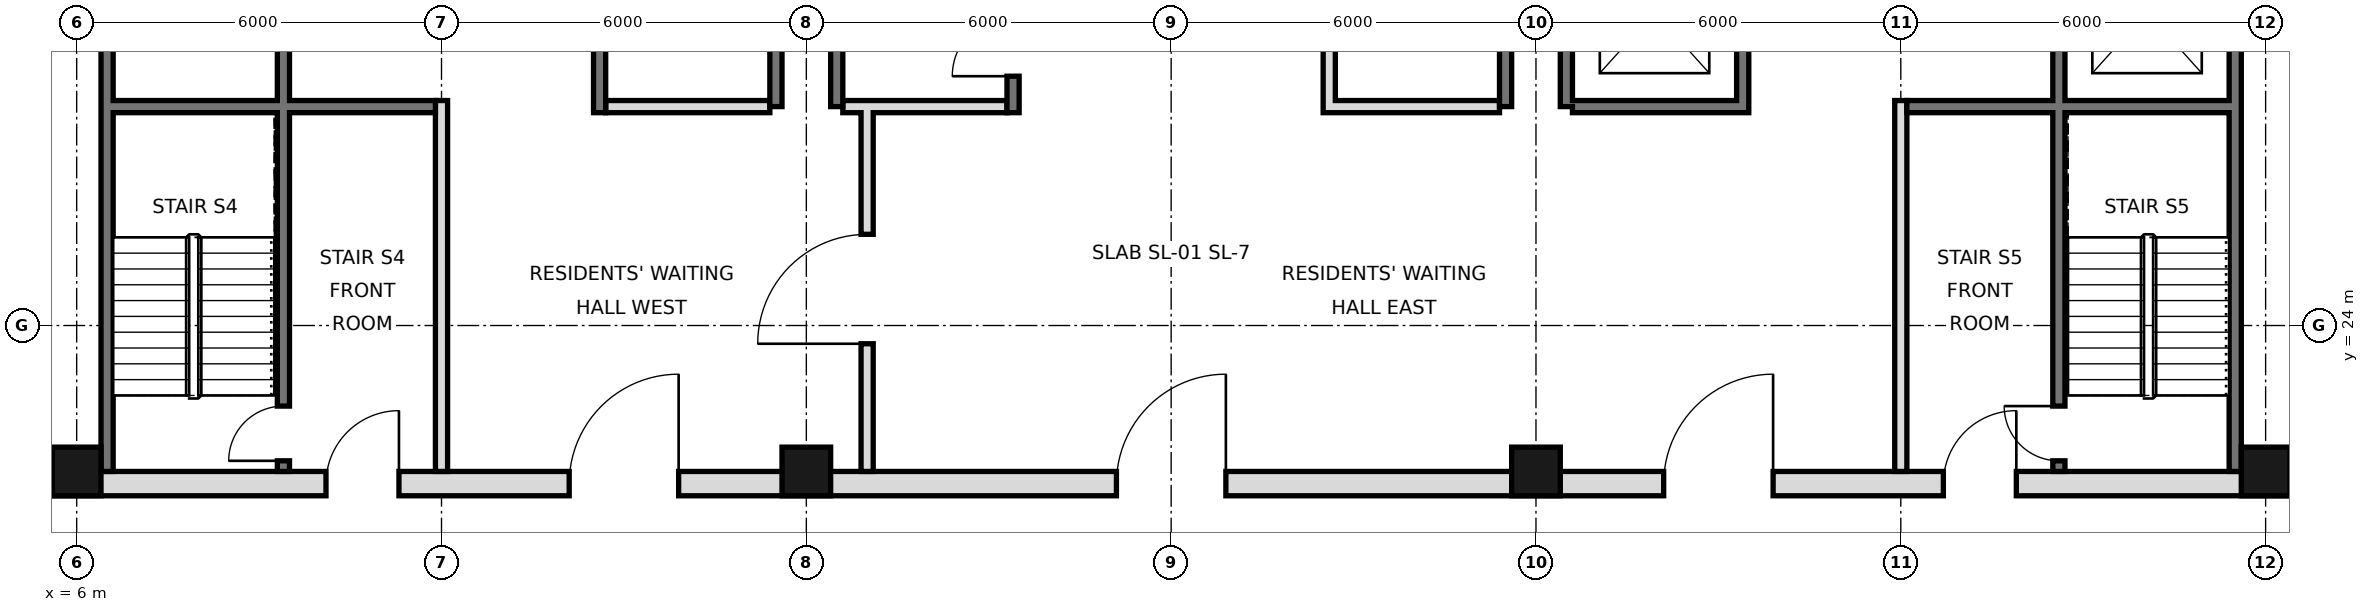
"""IFC4 building model, lengths in metres.
Left out: names, types, materials, properties, quantities, classifications, styles, units other than length and angle.
Written with IfcOpenShell. Run it as: python <this file> out.ifc"""

import sys

from ifc_helpers import new_model, si_unit, direction, frame, frame_2d, origin, origin_2d, place, context, subcontext, project, spatial, rectangle, hollow_rectangle, extrude, element, fill, save


model = new_model("IFC4")
c1 = context("Model", 3, precision=1e-05, world=origin(), true_north=direction((0.0, 1.0)))
c2 = subcontext(c1, "Body", "Model", "MODEL_VIEW")
j1 = project(units=[si_unit("LENGTHUNIT", "METRE"), si_unit("PLANEANGLEUNIT", "RADIAN")], contexts=[c1])
p1 = place(None, origin())
s1 = spatial("IfcSite", under=j1, at=p1, CompositionType="ELEMENT")
p2 = place(p1, origin())
s2 = spatial("IfcBuilding", under=s1, at=p2, CompositionType="ELEMENT")
p3 = place(p2, frame((0.0, 0.0, 250.4)))
s3 = spatial("IfcBuildingStorey", under=s2, at=p3, CompositionType="ELEMENT", Elevation=250.4)
for number, where, z_axis, x_axis in (
    (1, (6.0, 21.6, 0.0), (0.0, 0.0, 1.0), (1.0, 0.0, 0.0)),
    (2, (18.0, 21.6, 0.0), (0.0, 0.0, 1.0), (1.0, 0.0, 0.0)),
    (3, (30.0, 21.6, 0.0), (0.0, 0.0, 1.0), (1.0, 0.0, 0.0)),
    (4, (42.0, 21.6, 0.0), (0.0, 0.0, 1.0), (1.0, 0.0, 0.0)),
):
    element("IfcColumn", number, at=place(p3, frame(where, z_axis=z_axis, x_axis=x_axis)), inside=s3, PredefinedType="COLUMN", context=c2, shape_type="SweptSolid", body=[
        extrude(hollow_rectangle(XDim=0.8, YDim=0.8, WallThickness=0.032, at=origin_2d()), origin(), (0.0, 0.0, 1.0), 3.6),
    ])
for number, where, z_axis, x_axis in (
    (5, (6.5, 21.6, 0.0), (0.0, 0.0, 1.0), (0.0, 1.0, 0.0)),
    (6, (41.5, 21.6, 0.0), (0.0, 0.0, 1.0), (0.0, 1.0, 0.0)),
):
    element("IfcWall", number, at=place(p3, frame(where, z_axis=z_axis, x_axis=x_axis)), inside=s3, PredefinedType="SOLIDWALL", context=c2, shape_type="SweptSolid", body=[
        extrude(rectangle(XDim=23.5, YDim=0.2, at=frame_2d((11.75, 0.0))), origin(), (0.0, 0.0, 1.0), 3.42),
    ])
for number, where, z_axis, x_axis in (
    (7, (17.5, 27.6, 0.0), (0.0, 0.0, 1.0), (0.0, 1.0, 0.0)),
    (8, (18.5, 27.6, 0.0), (0.0, 0.0, 1.0), (0.0, 1.0, 0.0)),
    (9, (29.5, 27.6, 0.0), (0.0, 0.0, 1.0), (0.0, 1.0, 0.0)),
    (10, (30.5, 27.6, 0.0), (0.0, 0.0, 1.0), (0.0, 1.0, 0.0)),
):
    element("IfcWall", number, at=place(p3, frame(where, z_axis=z_axis, x_axis=x_axis)), inside=s3, PredefinedType="SOLIDWALL", context=c2, shape_type="SweptSolid", body=[
        extrude(rectangle(XDim=17.5, YDim=0.2, at=frame_2d((8.75, 0.0))), origin(), (0.0, 0.0, 1.0), 3.42),
    ])
p4 = place(p3, frame((5.6, 21.4, 0.0), z_axis=(0.0, 0.0, 1.0), x_axis=(1.0, 0.0, 0.0)))
e11 = element("IfcWall", 11, at=p4, inside=s3, PredefinedType="SOLIDWALL", context=c2, shape_type="SweptSolid", body=[
    extrude(rectangle(XDim=36.8, YDim=0.4, at=frame_2d((18.4, 0.0))), origin(), (0.0, 0.0, 1.0), 3.42),
])
p5 = place(p4, frame((8.5, 0.0, 0.0)))
e12 = element("IfcOpeningElement", 12, at=p5, cuts=e11, PredefinedType="OPENING", context=c2, shape_type="SweptSolid", body=[
    extrude(rectangle(XDim=1.8, YDim=2.1, at=frame_2d((0.9, 1.05))), frame((0.0, 0.21, 0.0), z_axis=(0.0, -1.0, 0.0), x_axis=(1.0, 0.0, 0.0)), (0.0, 0.0, 1.0), 0.42),
])
p6 = place(p4, frame((17.5, 0.0, 0.0)))
e13 = element("IfcOpeningElement", 13, at=p6, cuts=e11, PredefinedType="OPENING", context=c2, shape_type="SweptSolid", body=[
    extrude(rectangle(XDim=1.8, YDim=2.1, at=frame_2d((0.9, 1.05))), frame((0.0, 0.21, 0.0), z_axis=(0.0, -1.0, 0.0), x_axis=(1.0, 0.0, 0.0)), (0.0, 0.0, 1.0), 0.42),
])
p7 = place(p4, frame((26.5, 0.0, 0.0)))
e14 = element("IfcOpeningElement", 14, at=p7, cuts=e11, PredefinedType="OPENING", context=c2, shape_type="SweptSolid", body=[
    extrude(rectangle(XDim=1.8, YDim=2.1, at=frame_2d((0.9, 1.05))), frame((0.0, 0.21, 0.0), z_axis=(0.0, -1.0, 0.0), x_axis=(1.0, 0.0, 0.0)), (0.0, 0.0, 1.0), 0.42),
])
p8 = place(p4, frame((4.5, 0.0, 0.0)))
e15 = element("IfcOpeningElement", 15, at=p8, cuts=e11, PredefinedType="OPENING", context=c2, shape_type="SweptSolid", body=[
    extrude(rectangle(XDim=1.2, YDim=2.1, at=frame_2d((0.6, 1.05))), frame((0.0, 0.21, 0.0), z_axis=(0.0, -1.0, 0.0), x_axis=(1.0, 0.0, 0.0)), (0.0, 0.0, 1.0), 0.42),
])
p9 = place(p4, frame((31.1, 0.0, 0.0)))
e16 = element("IfcOpeningElement", 16, at=p9, cuts=e11, PredefinedType="OPENING", context=c2, shape_type="SweptSolid", body=[
    extrude(rectangle(XDim=1.2, YDim=2.1, at=frame_2d((0.6, 1.05))), frame((0.0, 0.21, 0.0), z_axis=(0.0, -1.0, 0.0), x_axis=(1.0, 0.0, 0.0)), (0.0, 0.0, 1.0), 0.42),
])
p10 = place(p3, frame((19.0, 21.6, 0.0), z_axis=(0.0, 0.0, 1.0), x_axis=(0.0, 1.0, 0.0)))
e17 = element("IfcWall", 17, at=p10, inside=s3, PredefinedType="PARTITIONING", context=c2, shape_type="SweptSolid", body=[
    extrude(rectangle(XDim=6.0, YDim=0.2, at=frame_2d((3.0, 0.0))), origin(), (0.0, 0.0, 1.0), 3.42),
])
p11 = place(p10, frame((2.1, 0.0, 0.0)))
e18 = element("IfcOpeningElement", 18, at=p11, cuts=e17, PredefinedType="OPENING", context=c2, shape_type="SweptSolid", body=[
    extrude(rectangle(XDim=1.8, YDim=2.1, at=frame_2d((0.9, 1.05))), frame((0.0, 0.11, 0.0), z_axis=(0.0, -1.0, 0.0), x_axis=(1.0, 0.0, 0.0)), (0.0, 0.0, 1.0), 0.22),
])
p12 = place(p3, frame((12.0, 21.6, 0.0), z_axis=(0.0, 0.0, 1.0), x_axis=(0.0, 1.0, 0.0)))
e19 = element("IfcWall", 19, at=p12, inside=s3, PredefinedType="PARTITIONING", context=c2, shape_type="SweptSolid", body=[
    extrude(rectangle(XDim=6.1, YDim=0.2, at=frame_2d((3.05, 0.0))), origin(), (0.0, 0.0, 1.0), 3.42),
])
p13 = place(p3, frame((14.6, 27.5, 0.0), z_axis=(0.0, 0.0, 1.0), x_axis=(0.0, 1.0, 0.0)))
e20 = element("IfcWall", 20, at=p13, inside=s3, PredefinedType="SOLIDWALL", context=c2, shape_type="SweptSolid", body=[
    extrude(rectangle(XDim=17.5, YDim=0.2, at=frame_2d((8.75, 0.0))), origin(), (0.0, 0.0, 1.0), 3.42),
])
p14 = place(p13, frame((15.4, 0.0, 0.0)))
e21 = element("IfcOpeningElement", 21, at=p14, cuts=e20, PredefinedType="OPENING", context=c2, shape_type="SweptSolid", body=[
    extrude(rectangle(XDim=1.1, YDim=2.1, at=frame_2d((0.55, 1.05))), frame((0.0, 0.11, 0.0), z_axis=(0.0, -1.0, 0.0), x_axis=(1.0, 0.0, 0.0)), (0.0, 0.0, 1.0), 0.22),
])
p15 = place(p13, frame((2.7, 0.0, 0.0)))
e22 = element("IfcOpeningElement", 22, at=p15, cuts=e20, PredefinedType="OPENING", context=c2, shape_type="SweptSolid", body=[
    extrude(rectangle(XDim=1.0, YDim=2.1, at=frame_2d((0.5, 1.05))), frame((0.0, 0.11, 0.0), z_axis=(0.0, -1.0, 0.0), x_axis=(1.0, 0.0, 0.0)), (0.0, 0.0, 1.0), 0.22),
])
p16 = place(p13, frame((9.9, 0.0, 0.0)))
e23 = element("IfcOpeningElement", 23, at=p16, cuts=e20, PredefinedType="OPENING", context=c2, shape_type="SweptSolid", body=[
    extrude(rectangle(XDim=0.9, YDim=2.1, at=frame_2d((0.45, 1.05))), frame((0.0, 0.11, 0.0), z_axis=(0.0, -1.0, 0.0), x_axis=(1.0, 0.0, 0.0)), (0.0, 0.0, 1.0), 0.22),
])
p17 = place(p3, frame((21.4, 27.5, 0.0), z_axis=(0.0, 0.0, 1.0), x_axis=(0.0, 1.0, 0.0)))
e24 = element("IfcWall", 24, at=p17, inside=s3, PredefinedType="SOLIDWALL", context=c2, shape_type="SweptSolid", body=[
    extrude(rectangle(XDim=17.5, YDim=0.2, at=frame_2d((8.75, 0.0))), origin(), (0.0, 0.0, 1.0), 3.42),
])
p18 = place(p17, frame((0.6, 0.0, 0.0)))
e25 = element("IfcOpeningElement", 25, at=p18, cuts=e24, PredefinedType="OPENING", context=c2, shape_type="SweptSolid", body=[
    extrude(rectangle(XDim=1.0, YDim=2.1, at=frame_2d((0.5, 1.05))), frame((0.0, 0.11, 0.0), z_axis=(0.0, -1.0, 0.0), x_axis=(1.0, 0.0, 0.0)), (0.0, 0.0, 1.0), 0.22),
])
p19 = place(p17, frame((3.7, 0.0, 0.0)))
e26 = element("IfcOpeningElement", 26, at=p19, cuts=e24, PredefinedType="OPENING", context=c2, shape_type="SweptSolid", body=[
    extrude(rectangle(XDim=1.0, YDim=2.1, at=frame_2d((0.5, 1.05))), frame((0.0, 0.11, 0.0), z_axis=(0.0, -1.0, 0.0), x_axis=(1.0, 0.0, 0.0)), (0.0, 0.0, 1.0), 0.22),
])
p20 = place(p17, frame((9.8, 0.0, 0.0)))
e27 = element("IfcOpeningElement", 27, at=p20, cuts=e24, PredefinedType="OPENING", context=c2, shape_type="SweptSolid", body=[
    extrude(rectangle(XDim=1.0, YDim=2.1, at=frame_2d((0.5, 1.05))), frame((0.0, 0.11, 0.0), z_axis=(0.0, -1.0, 0.0), x_axis=(1.0, 0.0, 0.0)), (0.0, 0.0, 1.0), 0.22),
])
p21 = place(p17, frame((7.4, 0.0, 0.0)))
e28 = element("IfcOpeningElement", 28, at=p21, cuts=e24, PredefinedType="OPENING", context=c2, shape_type="SweptSolid", body=[
    extrude(rectangle(XDim=0.9, YDim=2.1, at=frame_2d((0.45, 1.05))), frame((0.0, 0.11, 0.0), z_axis=(0.0, -1.0, 0.0), x_axis=(1.0, 0.0, 0.0)), (0.0, 0.0, 1.0), 0.22),
])
p22 = place(p3, frame((26.6, 27.5, 0.0), z_axis=(0.0, 0.0, 1.0), x_axis=(0.0, 1.0, 0.0)))
e29 = element("IfcWall", 29, at=p22, inside=s3, PredefinedType="SOLIDWALL", context=c2, shape_type="SweptSolid", body=[
    extrude(rectangle(XDim=17.5, YDim=0.2, at=frame_2d((8.75, 0.0))), origin(), (0.0, 0.0, 1.0), 3.42),
])
p23 = place(p22, frame((4.3, 0.0, 0.0)))
e30 = element("IfcOpeningElement", 30, at=p23, cuts=e29, PredefinedType="OPENING", context=c2, shape_type="SweptSolid", body=[
    extrude(rectangle(XDim=0.9, YDim=2.1, at=frame_2d((0.45, 1.05))), frame((0.0, 0.11, 0.0), z_axis=(0.0, -1.0, 0.0), x_axis=(1.0, 0.0, 0.0)), (0.0, 0.0, 1.0), 0.22),
])
p24 = place(p22, frame((10.35, 0.0, 0.0)))
e31 = element("IfcOpeningElement", 31, at=p24, cuts=e29, PredefinedType="OPENING", context=c2, shape_type="SweptSolid", body=[
    extrude(rectangle(XDim=1.0, YDim=2.1, at=frame_2d((0.5, 1.05))), frame((0.0, 0.11, 0.0), z_axis=(0.0, -1.0, 0.0), x_axis=(1.0, 0.0, 0.0)), (0.0, 0.0, 1.0), 0.22),
])
p25 = place(p3, frame((33.4, 27.5, 0.0), z_axis=(0.0, 0.0, 1.0), x_axis=(0.0, 1.0, 0.0)))
e32 = element("IfcWall", 32, at=p25, inside=s3, PredefinedType="SOLIDWALL", context=c2, shape_type="SweptSolid", body=[
    extrude(rectangle(XDim=17.5, YDim=0.2, at=frame_2d((8.75, 0.0))), origin(), (0.0, 0.0, 1.0), 3.42),
])
p26 = place(p25, frame((1.1, 0.0, 0.0)))
e33 = element("IfcOpeningElement", 33, at=p26, cuts=e32, PredefinedType="OPENING", context=c2, shape_type="SweptSolid", body=[
    extrude(rectangle(XDim=1.1, YDim=2.1, at=frame_2d((0.55, 1.05))), frame((0.0, 0.11, 0.0), z_axis=(0.0, -1.0, 0.0), x_axis=(1.0, 0.0, 0.0)), (0.0, 0.0, 1.0), 0.22),
])
p27 = place(p25, frame((4.2, 0.0, 0.0)))
e34 = element("IfcOpeningElement", 34, at=p27, cuts=e32, PredefinedType="OPENING", context=c2, shape_type="SweptSolid", body=[
    extrude(rectangle(XDim=1.1, YDim=2.1, at=frame_2d((0.55, 1.05))), frame((0.0, 0.11, 0.0), z_axis=(0.0, -1.0, 0.0), x_axis=(1.0, 0.0, 0.0)), (0.0, 0.0, 1.0), 0.22),
])
p28 = place(p25, frame((15.4, 0.0, 0.0)))
e35 = element("IfcOpeningElement", 35, at=p28, cuts=e32, PredefinedType="OPENING", context=c2, shape_type="SweptSolid", body=[
    extrude(rectangle(XDim=1.1, YDim=2.1, at=frame_2d((0.55, 1.05))), frame((0.0, 0.11, 0.0), z_axis=(0.0, -1.0, 0.0), x_axis=(1.0, 0.0, 0.0)), (0.0, 0.0, 1.0), 0.22),
])
p29 = place(p25, frame((9.9, 0.0, 0.0)))
e36 = element("IfcOpeningElement", 36, at=p29, cuts=e32, PredefinedType="OPENING", context=c2, shape_type="SweptSolid", body=[
    extrude(rectangle(XDim=0.9, YDim=2.1, at=frame_2d((0.45, 1.05))), frame((0.0, 0.11, 0.0), z_axis=(0.0, -1.0, 0.0), x_axis=(1.0, 0.0, 0.0)), (0.0, 0.0, 1.0), 0.22),
])
p30 = place(p3, frame((36.0, 21.6, 0.0), z_axis=(0.0, 0.0, 1.0), x_axis=(0.0, 1.0, 0.0)))
e37 = element("IfcWall", 37, at=p30, inside=s3, PredefinedType="PARTITIONING", context=c2, shape_type="SweptSolid", body=[
    extrude(rectangle(XDim=6.1, YDim=0.2, at=frame_2d((3.05, 0.0))), origin(), (0.0, 0.0, 1.0), 3.42),
])
p31 = place(p3, frame((38.6, 21.6, 0.0), z_axis=(0.0, 0.0, 1.0), x_axis=(0.0, 1.0, 0.0)))
e38 = element("IfcWall", 38, at=p31, inside=s3, PredefinedType="SOLIDWALL", context=c2, shape_type="SweptSolid", body=[
    extrude(rectangle(XDim=23.4, YDim=0.2, at=frame_2d((11.7, 0.0))), origin(), (0.0, 0.0, 1.0), 3.42),
])
p32 = place(p31, frame((7.0, 0.0, 0.0)))
e39 = element("IfcOpeningElement", 39, at=p32, cuts=e38, PredefinedType="OPENING", context=c2, shape_type="SweptSolid", body=[
    extrude(rectangle(XDim=1.1, YDim=2.1, at=frame_2d((0.55, 1.05))), frame((0.0, 0.11, 0.0), z_axis=(0.0, -1.0, 0.0), x_axis=(1.0, 0.0, 0.0)), (0.0, 0.0, 1.0), 0.22),
])
p33 = place(p31, frame((10.1, 0.0, 0.0)))
e40 = element("IfcOpeningElement", 40, at=p33, cuts=e38, PredefinedType="OPENING", context=c2, shape_type="SweptSolid", body=[
    extrude(rectangle(XDim=1.1, YDim=2.1, at=frame_2d((0.55, 1.05))), frame((0.0, 0.11, 0.0), z_axis=(0.0, -1.0, 0.0), x_axis=(1.0, 0.0, 0.0)), (0.0, 0.0, 1.0), 0.22),
])
p34 = place(p31, frame((13.2, 0.0, 0.0)))
e41 = element("IfcOpeningElement", 41, at=p34, cuts=e38, PredefinedType="OPENING", context=c2, shape_type="SweptSolid", body=[
    extrude(rectangle(XDim=1.1, YDim=2.1, at=frame_2d((0.55, 1.05))), frame((0.0, 0.11, 0.0), z_axis=(0.0, -1.0, 0.0), x_axis=(1.0, 0.0, 0.0)), (0.0, 0.0, 1.0), 0.22),
])
p35 = place(p31, frame((15.7, 0.0, 0.0)))
e42 = element("IfcOpeningElement", 42, at=p35, cuts=e38, PredefinedType="OPENING", context=c2, shape_type="SweptSolid", body=[
    extrude(rectangle(XDim=1.0, YDim=2.1, at=frame_2d((0.5, 1.05))), frame((0.0, 0.11, 0.0), z_axis=(0.0, -1.0, 0.0), x_axis=(1.0, 0.0, 0.0)), (0.0, 0.0, 1.0), 0.22),
])
p36 = place(p31, frame((0.175, 0.0, 0.0)))
e43 = element("IfcOpeningElement", 43, at=p36, cuts=e38, PredefinedType="OPENING", context=c2, shape_type="SweptSolid", body=[
    extrude(rectangle(XDim=0.9, YDim=2.1, at=frame_2d((0.45, 1.05))), frame((0.0, 0.11, 0.0), z_axis=(0.0, -1.0, 0.0), x_axis=(1.0, 0.0, 0.0)), (0.0, 0.0, 1.0), 0.22),
])
p37 = place(p3, frame((9.4, 21.6, 0.0), z_axis=(0.0, 0.0, 1.0), x_axis=(0.0, 1.0, 0.0)))
e44 = element("IfcWall", 44, at=p37, inside=s3, PredefinedType="SOLIDWALL", context=c2, shape_type="SweptSolid", body=[
    extrude(rectangle(XDim=23.4, YDim=0.2, at=frame_2d((11.7, 0.0))), origin(), (0.0, 0.0, 1.0), 3.42),
])
p38 = place(p37, frame((7.95, 0.0, 0.0)))
e45 = element("IfcOpeningElement", 45, at=p38, cuts=e44, PredefinedType="OPENING", context=c2, shape_type="SweptSolid", body=[
    extrude(rectangle(XDim=1.0, YDim=2.1, at=frame_2d((0.5, 1.05))), frame((0.0, 0.11, 0.0), z_axis=(0.0, -1.0, 0.0), x_axis=(1.0, 0.0, 0.0)), (0.0, 0.0, 1.0), 0.22),
])
p39 = place(p37, frame((12.6, 0.0, 0.0)))
e46 = element("IfcOpeningElement", 46, at=p39, cuts=e44, PredefinedType="OPENING", context=c2, shape_type="SweptSolid", body=[
    extrude(rectangle(XDim=1.0, YDim=2.1, at=frame_2d((0.5, 1.05))), frame((0.0, 0.11, 0.0), z_axis=(0.0, -1.0, 0.0), x_axis=(1.0, 0.0, 0.0)), (0.0, 0.0, 1.0), 0.22),
])
p40 = place(p37, frame((15.7, 0.0, 0.0)))
e47 = element("IfcOpeningElement", 47, at=p40, cuts=e44, PredefinedType="OPENING", context=c2, shape_type="SweptSolid", body=[
    extrude(rectangle(XDim=1.0, YDim=2.1, at=frame_2d((0.5, 1.05))), frame((0.0, 0.11, 0.0), z_axis=(0.0, -1.0, 0.0), x_axis=(1.0, 0.0, 0.0)), (0.0, 0.0, 1.0), 0.22),
])
p41 = place(p37, frame((0.175, 0.0, 0.0)))
e48 = element("IfcOpeningElement", 48, at=p41, cuts=e44, PredefinedType="OPENING", context=c2, shape_type="SweptSolid", body=[
    extrude(rectangle(XDim=0.9, YDim=2.1, at=frame_2d((0.45, 1.05))), frame((0.0, 0.11, 0.0), z_axis=(0.0, -1.0, 0.0), x_axis=(1.0, 0.0, 0.0)), (0.0, 0.0, 1.0), 0.22),
])
for number, where, z_axis, x_axis in (
    (49, (14.7, 27.6, 0.0), (0.0, 0.0, 1.0), (1.0, 0.0, 0.0)),
    (50, (18.6, 27.6, 0.0), (0.0, 0.0, 1.0), (1.0, 0.0, 0.0)),
):
    element("IfcWall", number, at=place(p3, frame(where, z_axis=z_axis, x_axis=x_axis)), inside=s3, PredefinedType="PARTITIONING", context=c2, shape_type="SweptSolid", body=[
        extrude(rectangle(XDim=2.7, YDim=0.2, at=frame_2d((1.35, 0.0))), origin(), (0.0, 0.0, 1.0), 3.42),
    ])
for number, where, z_axis, x_axis in (
    (51, (26.7, 27.6, 0.0), (0.0, 0.0, 1.0), (1.0, 0.0, 0.0)),
    (52, (30.6, 27.6, 0.0), (0.0, 0.0, 1.0), (1.0, 0.0, 0.0)),
):
    element("IfcWall", number, at=place(p3, frame(where, z_axis=z_axis, x_axis=x_axis)), inside=s3, PredefinedType="SOLIDWALL", context=c2, shape_type="SweptSolid", body=[
        extrude(rectangle(XDim=2.7, YDim=0.2, at=frame_2d((1.35, 0.0))), origin(), (0.0, 0.0, 1.0), 3.42),
    ])
for number, where, z_axis, x_axis in (
    (53, (36.1, 27.6, 0.0), (0.0, 0.0, 1.0), (1.0, 0.0, 0.0)),
    (54, (6.6, 27.6, 0.0), (0.0, 0.0, 1.0), (1.0, 0.0, 0.0)),
):
    element("IfcWall", number, at=place(p3, frame(where, z_axis=z_axis, x_axis=x_axis)), inside=s3, PredefinedType="SOLIDWALL", context=c2, shape_type="SweptSolid", body=[
        extrude(rectangle(XDim=5.3, YDim=0.2, at=frame_2d((2.65, 0.0))), origin(), (0.0, 0.0, 1.0), 3.42),
    ])
p42 = place(p5, frame((1.8, 0.0, 0.0), z_axis=(0.0, 0.0, 1.0), x_axis=(-1.0, 0.0, 0.0)))
e55 = element("IfcDoor", 55, at=p42, inside=s3, OperationType="SINGLE_SWING_LEFT", PredefinedType="DOOR", context=c2, shape_type="SweptSolid", body=[
    extrude(rectangle(XDim=1.8, YDim=2.1, at=frame_2d((0.9, 1.05))), frame((0.0, 0.025, 0.0), z_axis=(0.0, -1.0, 0.0), x_axis=(1.0, 0.0, 0.0)), (0.0, 0.0, 1.0), 0.05),
])
fill(e12, e55)
p43 = place(p11, origin())
e56 = element("IfcDoor", 56, at=p43, inside=s3, OperationType="SINGLE_SWING_LEFT", PredefinedType="DOOR", context=c2, shape_type="SweptSolid", body=[
    extrude(rectangle(XDim=1.8, YDim=2.1, at=frame_2d((0.9, 1.05))), frame((0.0, 0.025, 0.0), z_axis=(0.0, -1.0, 0.0), x_axis=(1.0, 0.0, 0.0)), (0.0, 0.0, 1.0), 0.05),
])
fill(e18, e56)
p44 = place(p6, frame((1.8, 0.0, 0.0), z_axis=(0.0, 0.0, 1.0), x_axis=(-1.0, 0.0, 0.0)))
e57 = element("IfcDoor", 57, at=p44, inside=s3, OperationType="SINGLE_SWING_LEFT", PredefinedType="DOOR", context=c2, shape_type="SweptSolid", body=[
    extrude(rectangle(XDim=1.8, YDim=2.1, at=frame_2d((0.9, 1.05))), frame((0.0, 0.025, 0.0), z_axis=(0.0, -1.0, 0.0), x_axis=(1.0, 0.0, 0.0)), (0.0, 0.0, 1.0), 0.05),
])
fill(e13, e57)
p45 = place(p7, frame((1.8, 0.0, 0.0), z_axis=(0.0, 0.0, 1.0), x_axis=(-1.0, 0.0, 0.0)))
e58 = element("IfcDoor", 58, at=p45, inside=s3, OperationType="SINGLE_SWING_LEFT", PredefinedType="DOOR", context=c2, shape_type="SweptSolid", body=[
    extrude(rectangle(XDim=1.8, YDim=2.1, at=frame_2d((0.9, 1.05))), frame((0.0, 0.025, 0.0), z_axis=(0.0, -1.0, 0.0), x_axis=(1.0, 0.0, 0.0)), (0.0, 0.0, 1.0), 0.05),
])
fill(e14, e58)
p46 = place(p8, frame((1.2, 0.0, 0.0), z_axis=(0.0, 0.0, 1.0), x_axis=(-1.0, 0.0, 0.0)))
e59 = element("IfcDoor", 59, at=p46, inside=s3, OperationType="SINGLE_SWING_LEFT", PredefinedType="DOOR", context=c2, shape_type="SweptSolid", body=[
    extrude(rectangle(XDim=1.2, YDim=2.1, at=frame_2d((0.6, 1.05))), frame((0.0, 0.025, 0.0), z_axis=(0.0, -1.0, 0.0), x_axis=(1.0, 0.0, 0.0)), (0.0, 0.0, 1.0), 0.05),
])
fill(e15, e59)
p47 = place(p9, frame((1.2, 0.0, 0.0), z_axis=(0.0, 0.0, 1.0), x_axis=(-1.0, 0.0, 0.0)))
e60 = element("IfcDoor", 60, at=p47, inside=s3, OperationType="SINGLE_SWING_LEFT", PredefinedType="DOOR", context=c2, shape_type="SweptSolid", body=[
    extrude(rectangle(XDim=1.2, YDim=2.1, at=frame_2d((0.6, 1.05))), frame((0.0, 0.025, 0.0), z_axis=(0.0, -1.0, 0.0), x_axis=(1.0, 0.0, 0.0)), (0.0, 0.0, 1.0), 0.05),
])
fill(e16, e60)
p48 = place(p18, origin())
e61 = element("IfcDoor", 61, at=p48, inside=s3, OperationType="SINGLE_SWING_LEFT", PredefinedType="DOOR", context=c2, shape_type="SweptSolid", body=[
    extrude(rectangle(XDim=1.0, YDim=2.1, at=frame_2d((0.5, 1.05))), frame((0.0, 0.025, 0.0), z_axis=(0.0, -1.0, 0.0), x_axis=(1.0, 0.0, 0.0)), (0.0, 0.0, 1.0), 0.05),
])
fill(e25, e61)
p49 = place(p41, origin())
e62 = element("IfcDoor", 62, at=p49, inside=s3, OperationType="SINGLE_SWING_LEFT", PredefinedType="DOOR", context=c2, shape_type="SweptSolid", body=[
    extrude(rectangle(XDim=0.9, YDim=2.1, at=frame_2d((0.45, 1.05))), frame((0.0, 0.025, 0.0), z_axis=(0.0, -1.0, 0.0), x_axis=(1.0, 0.0, 0.0)), (0.0, 0.0, 1.0), 0.05),
])
fill(e48, e62)
p50 = place(p36, frame((0.9, 0.0, 0.0), z_axis=(0.0, 0.0, 1.0), x_axis=(-1.0, 0.0, 0.0)))
e63 = element("IfcDoor", 63, at=p50, inside=s3, OperationType="SINGLE_SWING_LEFT", PredefinedType="DOOR", context=c2, shape_type="SweptSolid", body=[
    extrude(rectangle(XDim=0.9, YDim=2.1, at=frame_2d((0.45, 1.05))), frame((0.0, 0.025, 0.0), z_axis=(0.0, -1.0, 0.0), x_axis=(1.0, 0.0, 0.0)), (0.0, 0.0, 1.0), 0.05),
])
fill(e43, e63)
save(model, sys.argv[1])
